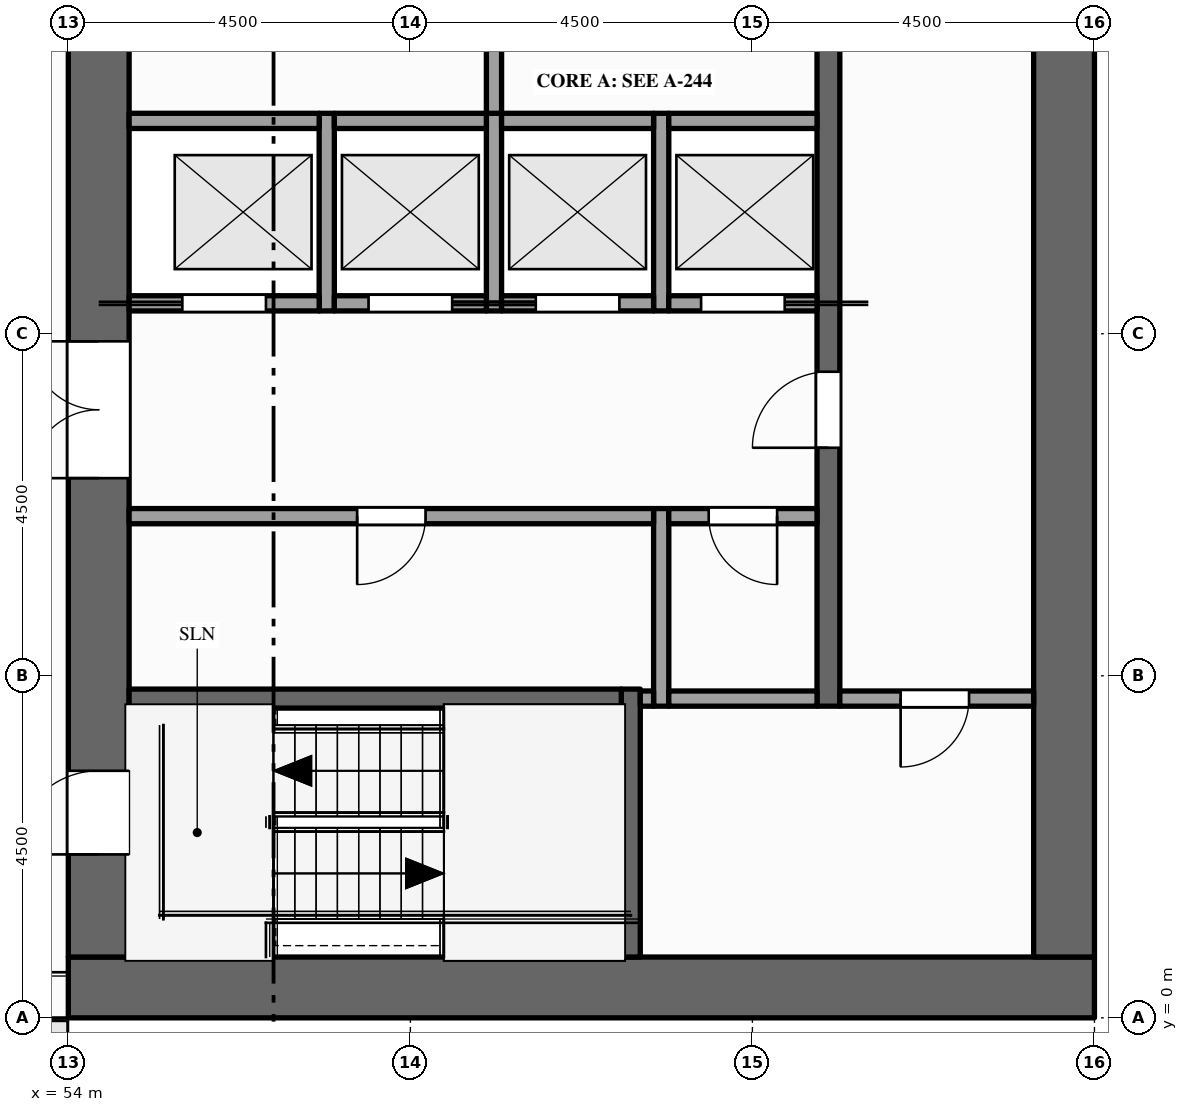
"""IFC4 building model, lengths in metres.
Left out: names, types, materials, properties, quantities, classifications, styles, units other than length and angle.
Written with IfcOpenShell. Run it as: python <this file> out.ifc"""

import sys

from ifc_helpers import new_model, si_unit, direction, frame, frame_2d, origin, place, context, subcontext, project, spatial, rectangle, extrude, element, fill, save


model = new_model("IFC4")
c1 = context("Model", 3, precision=1e-05, world=origin(), true_north=direction((0.0, 1.0)))
c2 = subcontext(c1, "Body", "Model", "MODEL_VIEW")
j1 = project(units=[si_unit("LENGTHUNIT", "METRE"), si_unit("PLANEANGLEUNIT", "RADIAN")], contexts=[c1])
p1 = place(None, origin())
s1 = spatial("IfcSite", under=j1, at=p1, CompositionType="ELEMENT")
p2 = place(p1, origin())
s2 = spatial("IfcBuilding", under=s1, at=p2, CompositionType="ELEMENT")
p3 = place(p2, frame((0.0, 0.0, 243.0)))
s3 = spatial("IfcBuildingStorey", under=s2, at=p3, CompositionType="ELEMENT", Elevation=243.0)
p4 = place(p3, frame((67.5, 0.4, -0.15), z_axis=(0.0, 0.0, 1.0), x_axis=(-1.0, 0.0, 0.0)))
e1 = element("IfcWall", 1, at=p4, inside=s3, PredefinedType="SHEAR", context=c2, shape_type="SweptSolid", body=[
    extrude(rectangle(XDim=13.5, YDim=0.8, at=frame_2d((6.75, 0.0))), origin(), (0.0, 0.0, 1.0), 6.0),
])
p5 = place(p3, frame((54.4, 0.8, -0.15), z_axis=(0.0, 0.0, 1.0), x_axis=(0.0, 1.0, 0.0)))
e2 = element("IfcWall", 2, at=p5, inside=s3, PredefinedType="SHEAR", context=c2, shape_type="SweptSolid", body=[
    extrude(rectangle(XDim=20.9, YDim=0.8, at=frame_2d((10.45, 0.0))), origin(), (0.0, 0.0, 1.0), 6.0),
])
p6 = place(p5, frame((6.3, 0.0, 0.15)))
e3 = element("IfcOpeningElement", 3, at=p6, cuts=e2, PredefinedType="OPENING", context=c2, shape_type="SweptSolid", body=[
    extrude(rectangle(XDim=1.8, YDim=2.1, at=frame_2d((0.9, 1.05))), frame((0.0, 0.41, 0.0), z_axis=(0.0, -1.0, 0.0), x_axis=(1.0, 0.0, 0.0)), (0.0, 0.0, 1.0), 0.82),
])
p7 = place(p5, frame((12.35, 0.0, 0.15)))
e4 = element("IfcOpeningElement", 4, at=p7, cuts=e2, PredefinedType="OPENING", context=c2, shape_type="SweptSolid", body=[
    extrude(rectangle(XDim=1.1, YDim=2.1, at=frame_2d((0.55, 1.05))), frame((0.0, 0.41, 0.0), z_axis=(0.0, -1.0, 0.0), x_axis=(1.0, 0.0, 0.0)), (0.0, 0.0, 1.0), 0.82),
])
p8 = place(p5, frame((1.35, 0.0, 0.15)))
e5 = element("IfcOpeningElement", 5, at=p8, cuts=e2, PredefinedType="OPENING", context=c2, shape_type="SweptSolid", body=[
    extrude(rectangle(XDim=1.1, YDim=2.1, at=frame_2d((0.55, 1.05))), frame((0.0, 0.41, 0.0), z_axis=(0.0, -1.0, 0.0), x_axis=(1.0, 0.0, 0.0)), (0.0, 0.0, 1.0), 0.82),
])
p9 = place(p5, frame((18.55, 0.0, 0.15)))
e6 = element("IfcOpeningElement", 6, at=p9, cuts=e2, PredefinedType="OPENING", context=c2, shape_type="SweptSolid", body=[
    extrude(rectangle(XDim=1.1, YDim=2.1, at=frame_2d((0.55, 1.05))), frame((0.0, 0.41, 0.0), z_axis=(0.0, -1.0, 0.0), x_axis=(1.0, 0.0, 0.0)), (0.0, 0.0, 1.0), 0.82),
])
p10 = place(p3, frame((67.1, 0.8, -0.15), z_axis=(0.0, 0.0, 1.0), x_axis=(0.0, 1.0, 0.0)))
e7 = element("IfcWall", 7, at=p10, inside=s3, PredefinedType="SHEAR", context=c2, shape_type="SweptSolid", body=[
    extrude(rectangle(XDim=20.9, YDim=0.8, at=frame_2d((10.45, 0.0))), origin(), (0.0, 0.0, 1.0), 6.0),
])
for number, where, z_axis, x_axis in (
    (8, (57.4, 9.3, 0.0), (0.0, 0.0, 1.0), (0.0, 1.0, 0.0)),
    (9, (59.6, 9.3, 0.0), (0.0, 0.0, 1.0), (0.0, 1.0, 0.0)),
):
    element("IfcWall", number, at=place(p3, frame(where, z_axis=z_axis, x_axis=x_axis)), inside=s3, PredefinedType="SOLIDWALL", context=c2, shape_type="SweptSolid", body=[
        extrude(rectangle(XDim=2.6, YDim=0.2, at=frame_2d((1.3, 0.0))), origin(), (0.0, 0.0, 1.0), 5.85),
    ])
p11 = place(p3, frame((59.6, 11.9, 0.0), z_axis=(0.0, 0.0, 1.0), x_axis=(0.0, 1.0, 0.0)))
e10 = element("IfcWall", 10, at=p11, inside=s3, PredefinedType="PARTITIONING", context=c2, shape_type="SweptSolid", body=[
    extrude(rectangle(XDim=3.6, YDim=0.2, at=frame_2d((1.8, 0.0))), origin(), (0.0, 0.0, 1.0), 5.85),
])
p12 = place(p11, frame((1.3, 0.0, 0.0)))
e11 = element("IfcOpeningElement", 11, at=p12, cuts=e10, PredefinedType="OPENING", context=c2, shape_type="SweptSolid", body=[
    extrude(rectangle(XDim=1.0, YDim=2.1, at=frame_2d((0.5, 1.05))), frame((0.0, 0.11, 0.0), z_axis=(0.0, -1.0, 0.0), x_axis=(1.0, 0.0, 0.0)), (0.0, 0.0, 1.0), 0.22),
])
p13 = place(p3, frame((61.4, 0.8, 0.0), z_axis=(0.0, 0.0, 1.0), x_axis=(0.0, 1.0, 0.0)))
e12 = element("IfcWall", 12, at=p13, inside=s3, PredefinedType="SHEAR", context=c2, shape_type="SweptSolid", body=[
    extrude(rectangle(XDim=3.525, YDim=0.25, at=frame_2d((1.762, 0.0))), origin(), (0.0, 0.0, 1.0), 5.85),
])
p14 = place(p3, frame((61.8, 4.1, 0.0), z_axis=(0.0, 0.0, 1.0), x_axis=(0.0, 1.0, 0.0)))
e13 = element("IfcWall", 13, at=p14, inside=s3, PredefinedType="PARTITIONING", context=c2, shape_type="SweptSolid", body=[
    extrude(rectangle(XDim=2.6, YDim=0.2, at=frame_2d((1.3, 0.0))), origin(), (0.0, 0.0, 1.0), 5.85),
])
p15 = place(p3, frame((61.8, 9.3, 0.0), z_axis=(0.0, 0.0, 1.0), x_axis=(0.0, 1.0, 0.0)))
e14 = element("IfcWall", 14, at=p15, inside=s3, PredefinedType="SOLIDWALL", context=c2, shape_type="SweptSolid", body=[
    extrude(rectangle(XDim=2.6, YDim=0.2, at=frame_2d((1.3, 0.0))), origin(), (0.0, 0.0, 1.0), 5.85),
])
p16 = place(p3, frame((64.0, 4.1, 0.0), z_axis=(0.0, 0.0, 1.0), x_axis=(0.0, 1.0, 0.0)))
e15 = element("IfcWall", 15, at=p16, inside=s3, PredefinedType="SHEAR", context=c2, shape_type="SweptSolid", body=[
    extrude(rectangle(XDim=14.5, YDim=0.3, at=frame_2d((7.25, 0.0))), origin(), (0.0, 0.0, 1.0), 5.85),
])
p17 = place(p16, frame((3.4, 0.0, 0.0)))
e16 = element("IfcOpeningElement", 16, at=p17, cuts=e15, PredefinedType="OPENING", context=c2, shape_type="SweptSolid", body=[
    extrude(rectangle(XDim=1.0, YDim=2.1, at=frame_2d((0.5, 1.05))), frame((0.0, 0.16, 0.0), z_axis=(0.0, -1.0, 0.0), x_axis=(1.0, 0.0, 0.0)), (0.0, 0.0, 1.0), 0.32),
])
p18 = place(p16, frame((9.1, 0.0, 0.0)))
e17 = element("IfcOpeningElement", 17, at=p18, cuts=e15, PredefinedType="OPENING", context=c2, shape_type="SweptSolid", body=[
    extrude(rectangle(XDim=1.0, YDim=2.1, at=frame_2d((0.5, 1.05))), frame((0.0, 0.16, 0.0), z_axis=(0.0, -1.0, 0.0), x_axis=(1.0, 0.0, 0.0)), (0.0, 0.0, 1.0), 0.32),
])
p19 = place(p3, frame((54.8, 4.2, 0.0), z_axis=(0.0, 0.0, 1.0), x_axis=(1.0, 0.0, 0.0)))
e18 = element("IfcWall", 18, at=p19, inside=s3, PredefinedType="SHEAR", context=c2, shape_type="SweptSolid", body=[
    extrude(rectangle(XDim=6.475, YDim=0.25, at=frame_2d((3.237, 0.0))), origin(), (0.0, 0.0, 1.0), 5.85),
])
p20 = place(p3, frame((61.525, 4.2, 0.0), z_axis=(0.0, 0.0, 1.0), x_axis=(1.0, 0.0, 0.0)))
e19 = element("IfcWall", 19, at=p20, inside=s3, PredefinedType="PARTITIONING", context=c2, shape_type="SweptSolid", body=[
    extrude(rectangle(XDim=0.175, YDim=0.2, at=frame_2d((0.087, 0.0))), origin(), (0.0, 0.0, 1.0), 5.85),
])
p21 = place(p3, frame((61.9, 4.2, 0.0), z_axis=(0.0, 0.0, 1.0), x_axis=(1.0, 0.0, 0.0)))
e20 = element("IfcWall", 20, at=p21, inside=s3, PredefinedType="PARTITIONING", context=c2, shape_type="SweptSolid", body=[
    extrude(rectangle(XDim=1.95, YDim=0.2, at=frame_2d((0.975, 0.0))), origin(), (0.0, 0.0, 1.0), 5.85),
])
p22 = place(p3, frame((64.15, 4.2, 0.0), z_axis=(0.0, 0.0, 1.0), x_axis=(1.0, 0.0, 0.0)))
e21 = element("IfcWall", 21, at=p22, inside=s3, PredefinedType="PARTITIONING", context=c2, shape_type="SweptSolid", body=[
    extrude(rectangle(XDim=2.55, YDim=0.2, at=frame_2d((1.275, 0.0))), origin(), (0.0, 0.0, 1.0), 5.85),
])
p23 = place(p22, frame((0.8, 0.0, 0.0)))
e22 = element("IfcOpeningElement", 22, at=p23, cuts=e21, PredefinedType="OPENING", context=c2, shape_type="SweptSolid", body=[
    extrude(rectangle(XDim=0.9, YDim=2.1, at=frame_2d((0.45, 1.05))), frame((0.0, 0.11, 0.0), z_axis=(0.0, -1.0, 0.0), x_axis=(1.0, 0.0, 0.0)), (0.0, 0.0, 1.0), 0.22),
])
p24 = place(p3, frame((54.8, 6.6, 0.0), z_axis=(0.0, 0.0, 1.0), x_axis=(1.0, 0.0, 0.0)))
e23 = element("IfcWall", 23, at=p24, inside=s3, PredefinedType="PARTITIONING", context=c2, shape_type="SweptSolid", body=[
    extrude(rectangle(XDim=6.9, YDim=0.2, at=frame_2d((3.45, 0.0))), origin(), (0.0, 0.0, 1.0), 5.85),
])
p25 = place(p24, frame((3.0, 0.0, 0.0)))
e24 = element("IfcOpeningElement", 24, at=p25, cuts=e23, PredefinedType="OPENING", context=c2, shape_type="SweptSolid", body=[
    extrude(rectangle(XDim=0.9, YDim=2.1, at=frame_2d((0.45, 1.05))), frame((0.0, 0.11, 0.0), z_axis=(0.0, -1.0, 0.0), x_axis=(1.0, 0.0, 0.0)), (0.0, 0.0, 1.0), 0.22),
])
p26 = place(p3, frame((61.9, 6.6, 0.0), z_axis=(0.0, 0.0, 1.0), x_axis=(1.0, 0.0, 0.0)))
e25 = element("IfcWall", 25, at=p26, inside=s3, PredefinedType="PARTITIONING", context=c2, shape_type="SweptSolid", body=[
    extrude(rectangle(XDim=1.95, YDim=0.2, at=frame_2d((0.975, 0.0))), origin(), (0.0, 0.0, 1.0), 5.85),
])
p27 = place(p26, frame((0.525, 0.0, 0.0)))
e26 = element("IfcOpeningElement", 26, at=p27, cuts=e25, PredefinedType="OPENING", context=c2, shape_type="SweptSolid", body=[
    extrude(rectangle(XDim=0.9, YDim=2.1, at=frame_2d((0.45, 1.05))), frame((0.0, 0.11, 0.0), z_axis=(0.0, -1.0, 0.0), x_axis=(1.0, 0.0, 0.0)), (0.0, 0.0, 1.0), 0.22),
])
p28 = place(p3, frame((54.8, 9.4, 0.0), z_axis=(0.0, 0.0, 1.0), x_axis=(1.0, 0.0, 0.0)))
e27 = element("IfcWall", 27, at=p28, inside=s3, PredefinedType="SOLIDWALL", context=c2, shape_type="SweptSolid", body=[
    extrude(rectangle(XDim=2.5, YDim=0.2, at=frame_2d((1.25, 0.0))), origin(), (0.0, 0.0, 1.0), 5.85),
])
p29 = place(p28, frame((0.7, 0.0, 0.012)))
e28 = element("IfcOpeningElement", 28, at=p29, cuts=e27, PredefinedType="OPENING", context=c2, shape_type="SweptSolid", body=[
    extrude(rectangle(XDim=1.1, YDim=2.1, at=frame_2d((0.55, 1.05))), frame((0.0, 0.11, 0.0), z_axis=(0.0, -1.0, 0.0), x_axis=(1.0, 0.0, 0.0)), (0.0, 0.0, 1.0), 0.22),
])
p30 = place(p3, frame((57.5, 9.4, 0.0), z_axis=(0.0, 0.0, 1.0), x_axis=(1.0, 0.0, 0.0)))
e29 = element("IfcWall", 29, at=p30, inside=s3, PredefinedType="SOLIDWALL", context=c2, shape_type="SweptSolid", body=[
    extrude(rectangle(XDim=2.0, YDim=0.2, at=frame_2d((1.0, 0.0))), origin(), (0.0, 0.0, 1.0), 5.85),
])
p31 = place(p30, frame((0.45, 0.0, 0.012)))
e30 = element("IfcOpeningElement", 30, at=p31, cuts=e29, PredefinedType="OPENING", context=c2, shape_type="SweptSolid", body=[
    extrude(rectangle(XDim=1.1, YDim=2.1, at=frame_2d((0.55, 1.05))), frame((0.0, 0.11, 0.0), z_axis=(0.0, -1.0, 0.0), x_axis=(1.0, 0.0, 0.0)), (0.0, 0.0, 1.0), 0.22),
])
p32 = place(p3, frame((59.7, 9.4, 0.0), z_axis=(0.0, 0.0, 1.0), x_axis=(1.0, 0.0, 0.0)))
e31 = element("IfcWall", 31, at=p32, inside=s3, PredefinedType="SOLIDWALL", context=c2, shape_type="SweptSolid", body=[
    extrude(rectangle(XDim=2.0, YDim=0.2, at=frame_2d((1.0, 0.0))), origin(), (0.0, 0.0, 1.0), 5.85),
])
p33 = place(p32, frame((0.45, 0.0, 0.012)))
e32 = element("IfcOpeningElement", 32, at=p33, cuts=e31, PredefinedType="OPENING", context=c2, shape_type="SweptSolid", body=[
    extrude(rectangle(XDim=1.1, YDim=2.1, at=frame_2d((0.55, 1.05))), frame((0.0, 0.11, 0.0), z_axis=(0.0, -1.0, 0.0), x_axis=(1.0, 0.0, 0.0)), (0.0, 0.0, 1.0), 0.22),
])
p34 = place(p3, frame((61.9, 9.4, 0.0), z_axis=(0.0, 0.0, 1.0), x_axis=(1.0, 0.0, 0.0)))
e33 = element("IfcWall", 33, at=p34, inside=s3, PredefinedType="SOLIDWALL", context=c2, shape_type="SweptSolid", body=[
    extrude(rectangle(XDim=1.95, YDim=0.2, at=frame_2d((0.975, 0.0))), origin(), (0.0, 0.0, 1.0), 5.85),
])
p35 = place(p34, frame((0.425, 0.0, 0.012)))
e34 = element("IfcOpeningElement", 34, at=p35, cuts=e33, PredefinedType="OPENING", context=c2, shape_type="SweptSolid", body=[
    extrude(rectangle(XDim=1.1, YDim=2.1, at=frame_2d((0.55, 1.05))), frame((0.0, 0.11, 0.0), z_axis=(0.0, -1.0, 0.0), x_axis=(1.0, 0.0, 0.0)), (0.0, 0.0, 1.0), 0.22),
])
p36 = place(p3, frame((54.8, 11.8, 0.0), z_axis=(0.0, 0.0, 1.0), x_axis=(1.0, 0.0, 0.0)))
e35 = element("IfcWall", 35, at=p36, inside=s3, PredefinedType="SOLIDWALL", context=c2, shape_type="SweptSolid", body=[
    extrude(rectangle(XDim=2.5, YDim=0.2, at=frame_2d((1.25, 0.0))), origin(), (0.0, 0.0, 1.0), 5.85),
])
for number, where, z_axis, x_axis in (
    (36, (57.5, 11.8, 0.0), (0.0, 0.0, 1.0), (1.0, 0.0, 0.0)),
    (37, (59.7, 11.8, 0.0), (0.0, 0.0, 1.0), (1.0, 0.0, 0.0)),
):
    element("IfcWall", number, at=place(p3, frame(where, z_axis=z_axis, x_axis=x_axis)), inside=s3, PredefinedType="SOLIDWALL", context=c2, shape_type="SweptSolid", body=[
        extrude(rectangle(XDim=2.0, YDim=0.2, at=frame_2d((1.0, 0.0))), origin(), (0.0, 0.0, 1.0), 5.85),
    ])
p37 = place(p3, frame((61.9, 11.8, 0.0), z_axis=(0.0, 0.0, 1.0), x_axis=(1.0, 0.0, 0.0)))
e38 = element("IfcWall", 38, at=p37, inside=s3, PredefinedType="SOLIDWALL", context=c2, shape_type="SweptSolid", body=[
    extrude(rectangle(XDim=1.95, YDim=0.2, at=frame_2d((0.975, 0.0))), origin(), (0.0, 0.0, 1.0), 5.85),
])
p38 = place(p29, origin())
e39 = element("IfcDoor", 39, at=p38, inside=s3, OperationType="SLIDING_TO_LEFT", PredefinedType="DOOR", context=c2, shape_type="SweptSolid", body=[
    extrude(rectangle(XDim=1.1, YDim=2.1, at=frame_2d((0.55, 1.05))), frame((0.0, 0.025, 0.0), z_axis=(0.0, -1.0, 0.0), x_axis=(1.0, 0.0, 0.0)), (0.0, 0.0, 1.0), 0.05),
])
fill(e28, e39)
p39 = place(p31, origin())
e40 = element("IfcDoor", 40, at=p39, inside=s3, OperationType="SLIDING_TO_RIGHT", PredefinedType="DOOR", context=c2, shape_type="SweptSolid", body=[
    extrude(rectangle(XDim=1.1, YDim=2.1, at=frame_2d((0.55, 1.05))), frame((0.0, 0.025, 0.0), z_axis=(0.0, -1.0, 0.0), x_axis=(1.0, 0.0, 0.0)), (0.0, 0.0, 1.0), 0.05),
])
fill(e30, e40)
p40 = place(p33, origin())
e41 = element("IfcDoor", 41, at=p40, inside=s3, OperationType="SLIDING_TO_LEFT", PredefinedType="DOOR", context=c2, shape_type="SweptSolid", body=[
    extrude(rectangle(XDim=1.1, YDim=2.1, at=frame_2d((0.55, 1.05))), frame((0.0, 0.025, 0.0), z_axis=(0.0, -1.0, 0.0), x_axis=(1.0, 0.0, 0.0)), (0.0, 0.0, 1.0), 0.05),
])
fill(e32, e41)
p41 = place(p35, origin())
e42 = element("IfcDoor", 42, at=p41, inside=s3, OperationType="SLIDING_TO_RIGHT", PredefinedType="DOOR", context=c2, shape_type="SweptSolid", body=[
    extrude(rectangle(XDim=1.1, YDim=2.1, at=frame_2d((0.55, 1.05))), frame((0.0, 0.025, 0.0), z_axis=(0.0, -1.0, 0.0), x_axis=(1.0, 0.0, 0.0)), (0.0, 0.0, 1.0), 0.05),
])
fill(e34, e42)
p42 = place(p6, origin())
e43 = element("IfcDoor", 43, at=p42, inside=s3, OperationType="DOUBLE_DOOR_SINGLE_SWING", PredefinedType="DOOR", context=c2, shape_type="SweptSolid", body=[
    extrude(rectangle(XDim=1.8, YDim=2.1, at=frame_2d((0.9, 1.05))), frame((0.0, 0.025, 0.0), z_axis=(0.0, -1.0, 0.0), x_axis=(1.0, 0.0, 0.0)), (0.0, 0.0, 1.0), 0.05),
])
fill(e3, e43)
p43 = place(p17, origin())
e44 = element("IfcDoor", 44, at=p43, inside=s3, OperationType="SINGLE_SWING_LEFT", PredefinedType="DOOR", context=c2, shape_type="SweptSolid", body=[
    extrude(rectangle(XDim=1.0, YDim=2.1, at=frame_2d((0.5, 1.05))), frame((0.0, 0.025, 0.0), z_axis=(0.0, -1.0, 0.0), x_axis=(1.0, 0.0, 0.0)), (0.0, 0.0, 1.0), 0.05),
])
fill(e16, e44)
p44 = place(p8, origin())
e45 = element("IfcDoor", 45, at=p44, inside=s3, OperationType="SINGLE_SWING_LEFT", PredefinedType="DOOR", context=c2, shape_type="SweptSolid", body=[
    extrude(rectangle(XDim=1.1, YDim=2.1, at=frame_2d((0.55, 1.05))), frame((0.0, 0.025, 0.0), z_axis=(0.0, -1.0, 0.0), x_axis=(1.0, 0.0, 0.0)), (0.0, 0.0, 1.0), 0.05),
])
fill(e5, e45)
p45 = place(p23, origin())
e46 = element("IfcDoor", 46, at=p45, inside=s3, OperationType="SINGLE_SWING_LEFT", PredefinedType="DOOR", context=c2, shape_type="SweptSolid", body=[
    extrude(rectangle(XDim=0.9, YDim=2.1, at=frame_2d((0.45, 1.05))), frame((0.0, 0.025, 0.0), z_axis=(0.0, -1.0, 0.0), x_axis=(1.0, 0.0, 0.0)), (0.0, 0.0, 1.0), 0.05),
])
fill(e22, e46)
p46 = place(p25, origin())
e47 = element("IfcDoor", 47, at=p46, inside=s3, OperationType="SINGLE_SWING_LEFT", PredefinedType="DOOR", context=c2, shape_type="SweptSolid", body=[
    extrude(rectangle(XDim=0.9, YDim=2.1, at=frame_2d((0.45, 1.05))), frame((0.0, 0.025, 0.0), z_axis=(0.0, -1.0, 0.0), x_axis=(1.0, 0.0, 0.0)), (0.0, 0.0, 1.0), 0.05),
])
fill(e24, e47)
p47 = place(p27, origin())
e48 = element("IfcDoor", 48, at=p47, inside=s3, OperationType="SINGLE_SWING_RIGHT", PredefinedType="DOOR", context=c2, shape_type="SweptSolid", body=[
    extrude(rectangle(XDim=0.9, YDim=2.1, at=frame_2d((0.45, 1.05))), frame((0.0, 0.025, 0.0), z_axis=(0.0, -1.0, 0.0), x_axis=(1.0, 0.0, 0.0)), (0.0, 0.0, 1.0), 0.05),
])
fill(e26, e48)
save(model, sys.argv[1])
